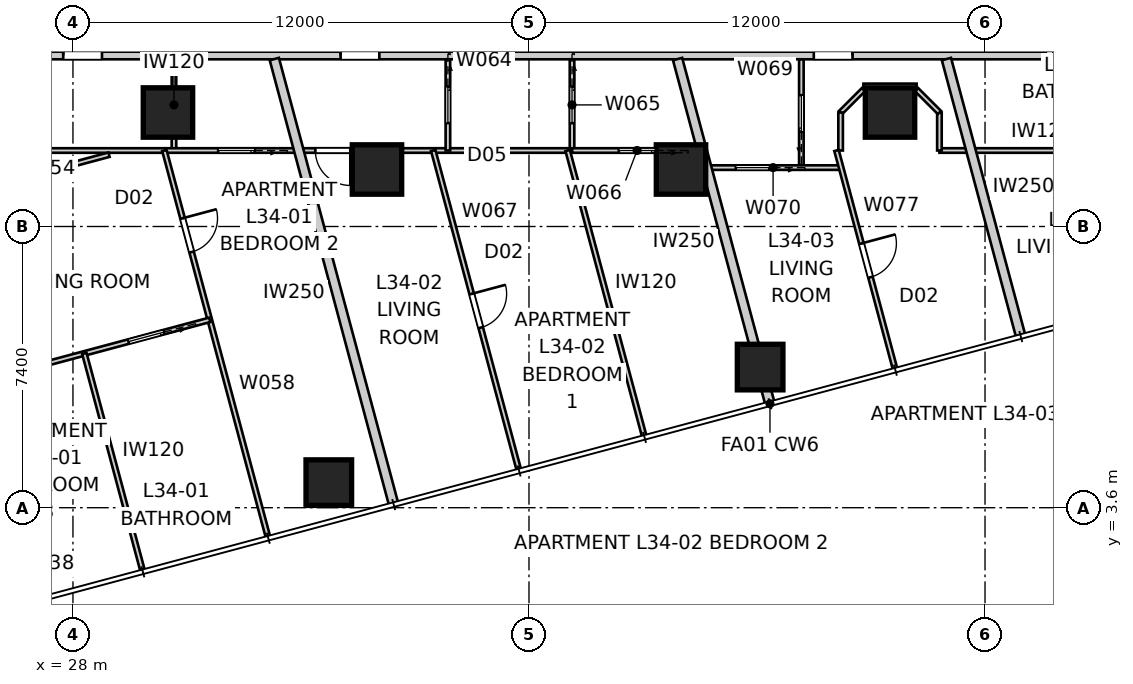
"""IFC4 building model, lengths in metres.
Left out: names, types, materials, properties, quantities, classifications, styles, units other than length and angle.
Written with IfcOpenShell. Run it as: python <this file> out.ifc"""

import sys

from ifc_helpers import new_model, si_unit, direction, frame, frame_2d, origin, origin_2d, place, context, subcontext, project, spatial, rectangle, extrude, element, fill, save


model = new_model("IFC4")
c1 = context("Model", 3, precision=1e-05, world=origin(), true_north=direction((0.0, 1.0)))
c2 = subcontext(c1, "Body", "Model", "MODEL_VIEW")
j1 = project(units=[si_unit("LENGTHUNIT", "METRE"), si_unit("PLANEANGLEUNIT", "RADIAN")], contexts=[c1])
p1 = place(None, origin())
s1 = spatial("IfcSite", under=j1, at=p1, CompositionType="ELEMENT")
p2 = place(p1, origin())
s2 = spatial("IfcBuilding", under=s1, at=p2, CompositionType="ELEMENT")
p3 = place(p2, frame((0.0, 0.0, 125.2)))
s3 = spatial("IfcBuildingStorey", under=s2, at=p3, CompositionType="ELEMENT", Elevation=125.2)
for number, where, z_axis, x_axis in (
    (1, (34.733, 4.26, 0.0), (0.0, 0.0, 1.0), (1.0, 0.0, 0.0)),
    (2, (46.082, 7.301, 0.0), (0.0, 0.0, 1.0), (1.0, 0.0, 0.0)),
):
    element("IfcColumn", number, at=place(p3, frame(where, z_axis=z_axis, x_axis=x_axis)), inside=s3, PredefinedType="COLUMN", context=c2, shape_type="SweptSolid", body=[
        extrude(rectangle(XDim=1.2, YDim=1.2, at=origin_2d()), origin(), (0.0, 0.0, 1.0), 3.4),
    ])
for number, where, z_axis, x_axis in (
    (3, (30.5, 14.0, 0.0), (0.0, 0.0, 1.0), (1.0, 0.0, 0.0)),
    (4, (36.0, 12.5, 0.0), (0.0, 0.0, 1.0), (1.0, 0.0, 0.0)),
    (5, (44.0, 12.5, 0.0), (0.0, 0.0, 1.0), (1.0, 0.0, 0.0)),
    (6, (49.5, 14.0, 0.0), (0.0, 0.0, 1.0), (1.0, 0.0, 0.0)),
):
    element("IfcColumn", number, at=place(p3, frame(where, z_axis=z_axis, x_axis=x_axis)), inside=s3, PredefinedType="COLUMN", context=c2, shape_type="SweptSolid", body=[
        extrude(rectangle(XDim=1.3, YDim=1.3, at=origin_2d()), origin(), (0.0, 0.0, 1.0), 3.4),
    ])
p4 = place(p3, frame((25.5, 15.5, 0.0), z_axis=(0.0, 0.0, 1.0), x_axis=(1.0, 0.0, 0.0)))
e7 = element("IfcWall", 7, at=p4, inside=s3, PredefinedType="PARTITIONING", context=c2, shape_type="SweptSolid", body=[
    extrude(rectangle(XDim=28.2, YDim=0.2, at=frame_2d((14.1, 0.0))), origin(), (0.0, 0.0, 1.0), 3.25),
])
p5 = place(p4, frame((2.244, 0.0, 0.0)))
e8 = element("IfcOpeningElement", 8, at=p5, cuts=e7, PredefinedType="OPENING", context=c2, shape_type="SweptSolid", body=[
    extrude(rectangle(XDim=1.02, YDim=2.1, at=frame_2d((0.51, 1.05))), frame((0.0, 0.11, 0.0), z_axis=(0.0, -1.0, 0.0), x_axis=(1.0, 0.0, 0.0)), (0.0, 0.0, 1.0), 0.22),
])
p6 = place(p4, frame((9.542, 0.0, 0.0)))
e9 = element("IfcOpeningElement", 9, at=p6, cuts=e7, PredefinedType="OPENING", context=c2, shape_type="SweptSolid", body=[
    extrude(rectangle(XDim=1.02, YDim=2.34, at=frame_2d((0.51, 1.17))), frame((0.0, 0.11, 0.0), z_axis=(0.0, -1.0, 0.0), x_axis=(1.0, 0.0, 0.0)), (0.0, 0.0, 1.0), 0.22),
])
p7 = place(p4, frame((21.994, 0.0, 0.0)))
e10 = element("IfcOpeningElement", 10, at=p7, cuts=e7, PredefinedType="OPENING", context=c2, shape_type="SweptSolid", body=[
    extrude(rectangle(XDim=1.02, YDim=2.34, at=frame_2d((0.51, 1.17))), frame((0.0, 0.11, 0.0), z_axis=(0.0, -1.0, 0.0), x_axis=(1.0, 0.0, 0.0)), (0.0, 0.0, 1.0), 0.22),
])
p8 = place(p3, frame((53.7, 15.5, 0.0), z_axis=(0.0, 0.0, 1.0), x_axis=(0.0, 1.0, 0.0)))
e11 = element("IfcWall", 11, at=p8, inside=s3, PredefinedType="PARTITIONING", context=c2, shape_type="SweptSolid", body=[
    extrude(rectangle(XDim=0.426, YDim=0.2, at=frame_2d((0.213, 0.0))), origin(), (0.0, 0.0, 1.0), 3.25),
])
p9 = place(p3, frame((36.44, 3.682, 0.0), z_axis=(0.0, 0.0, 1.0), x_axis=(-0.258824223352, 0.965924438766, 0.0)))
e12 = element("IfcWall", 12, at=p9, inside=s3, PredefinedType="PARTITIONING", context=c2, shape_type="SweptSolid", body=[
    extrude(rectangle(XDim=12.138, YDim=0.25, at=frame_2d((6.069, 0.0))), origin(), (0.0, 0.0, 1.0), 3.25),
])
p10 = place(p3, frame((46.341, 6.335, 0.0), z_axis=(0.0, 0.0, 1.0), x_axis=(-0.258814481793, 0.965927049013, 0.0)))
e13 = element("IfcWall", 13, at=p10, inside=s3, PredefinedType="PARTITIONING", context=c2, shape_type="SweptSolid", body=[
    extrude(rectangle(XDim=9.392, YDim=0.25, at=frame_2d((4.696, 0.0))), origin(), (0.0, 0.0, 1.0), 3.25),
])
p11 = place(p3, frame((52.942, 8.104, 0.0), z_axis=(0.0, 0.0, 1.0), x_axis=(-0.258822171171, 0.965924988656, 0.0)))
e14 = element("IfcWall", 14, at=p11, inside=s3, PredefinedType="PARTITIONING", context=c2, shape_type="SweptSolid", body=[
    extrude(rectangle(XDim=7.56, YDim=0.25, at=frame_2d((3.78, 0.0))), origin(), (0.0, 0.0, 1.0), 3.25),
])
p12 = place(p3, frame((30.658, 15.4, 0.0), z_axis=(0.0, 0.0, 1.0), x_axis=(0.0, -1.0, 0.0)))
e15 = element("IfcWall", 15, at=p12, inside=s3, PredefinedType="PARTITIONING", context=c2, shape_type="SweptSolid", body=[
    extrude(rectangle(XDim=2.4, YDim=0.12, at=frame_2d((1.2, 0.0))), origin(), (0.0, 0.0, 1.0), 3.25),
])
p13 = place(p3, frame((41.07, 13.0, 0.0), z_axis=(0.0, 0.0, 1.0), x_axis=(-1.0, 0.0, 0.0)))
e16 = element("IfcWall", 16, at=p13, inside=s3, PredefinedType="PARTITIONING", context=c2, shape_type="SweptSolid", body=[
    extrude(rectangle(XDim=15.67, YDim=0.12, at=frame_2d((7.835, 0.0))), origin(), (0.0, 0.0, 1.0), 2.55),
])
p14 = place(p13, frame((5.772, 0.0, 0.0)))
e17 = element("IfcOpeningElement", 17, at=p14, cuts=e16, PredefinedType="OPENING", context=c2, shape_type="SweptSolid", body=[
    extrude(rectangle(XDim=0.92, YDim=2.34, at=frame_2d((0.46, 1.17))), frame((0.0, 0.07, 0.0), z_axis=(0.0, -1.0, 0.0), x_axis=(1.0, 0.0, 0.0)), (0.0, 0.0, 1.0), 0.14),
])
p15 = place(p13, frame((8.289, 0.0, 0.0)))
e18 = element("IfcOpeningElement", 18, at=p15, cuts=e16, PredefinedType="OPENING", context=c2, shape_type="SweptSolid", body=[
    extrude(rectangle(XDim=0.96, YDim=2.1, at=frame_2d((0.48, 1.05))), frame((0.0, 0.07, 0.0), z_axis=(0.0, -1.0, 0.0), x_axis=(1.0, 0.0, 0.0)), (0.0, 0.0, 1.0), 0.14),
])
p16 = place(p3, frame((30.406, 13.0, 0.0), z_axis=(0.0, 0.0, 1.0), x_axis=(0.258819200315, -0.9659257847, 0.0)))
e19 = element("IfcWall", 19, at=p16, inside=s3, PredefinedType="PARTITIONING", context=c2, shape_type="SweptSolid", body=[
    extrude(rectangle(XDim=10.522, YDim=0.12, at=frame_2d((5.261, 0.0))), origin(), (0.0, 0.0, 1.0), 2.722),
])
p17 = place(p16, frame((1.846, 0.0, 0.0)))
e20 = element("IfcOpeningElement", 20, at=p17, cuts=e19, PredefinedType="OPENING", context=c2, shape_type="SweptSolid", body=[
    extrude(rectangle(XDim=0.92, YDim=2.34, at=frame_2d((0.46, 1.17))), frame((0.0, 0.07, 0.0), z_axis=(0.0, -1.0, 0.0), x_axis=(1.0, 0.0, 0.0)), (0.0, 0.0, 1.0), 0.14),
])
p18 = place(p3, frame((31.6, 8.544, 0.0), z_axis=(0.0, 0.0, 1.0), x_axis=(-0.965927151587, -0.258814098973, 0.0)))
e21 = element("IfcWall", 21, at=p18, inside=s3, PredefinedType="PARTITIONING", context=c2, shape_type="SweptSolid", body=[
    extrude(rectangle(XDim=10.793, YDim=0.12, at=frame_2d((5.396, 0.0))), origin(), (0.0, 0.0, 1.0), 3.25),
])
p19 = place(p18, frame((6.64, 0.0, 0.0)))
e22 = element("IfcOpeningElement", 22, at=p19, cuts=e21, PredefinedType="OPENING", context=c2, shape_type="SweptSolid", body=[
    extrude(rectangle(XDim=0.92, YDim=2.34, at=frame_2d((0.46, 1.17))), frame((0.0, 0.07, 0.0), z_axis=(0.0, -1.0, 0.0), x_axis=(1.0, 0.0, 0.0)), (0.0, 0.0, 1.0), 0.14),
])
p20 = place(p18, frame((1.253, 0.0, 0.0)))
e23 = element("IfcOpeningElement", 23, at=p20, cuts=e21, PredefinedType="OPENING", context=c2, shape_type="SweptSolid", body=[
    extrude(rectangle(XDim=0.96, YDim=2.1, at=frame_2d((0.48, 1.05))), frame((0.0, 0.07, 0.0), z_axis=(0.0, -1.0, 0.0), x_axis=(1.0, 0.0, 0.0)), (0.0, 0.0, 1.0), 0.14),
])
p21 = place(p3, frame((19.911, 10.468, 0.0), z_axis=(0.0, 0.0, 1.0), x_axis=(0.965927203676, 0.25881390457, 0.0)))
e24 = element("IfcWall", 24, at=p21, inside=s3, PredefinedType="PARTITIONING", context=c2, shape_type="SweptSolid", body=[
    extrude(rectangle(XDim=9.357, YDim=0.12, at=frame_2d((4.678, 0.0))), origin(), (0.0, 0.0, 1.0), 2.638),
])
p22 = place(p21, frame((4.411, 0.0, 0.0)))
e25 = element("IfcOpeningElement", 25, at=p22, cuts=e24, PredefinedType="OPENING", context=c2, shape_type="SweptSolid", body=[
    extrude(rectangle(XDim=0.92, YDim=2.34, at=frame_2d((0.46, 1.17))), frame((0.0, 0.07, 0.0), z_axis=(0.0, -1.0, 0.0), x_axis=(1.0, 0.0, 0.0)), (0.0, 0.0, 1.0), 0.14),
])
p23 = place(p3, frame((28.3, 7.66, 0.0), z_axis=(0.0, 0.0, 1.0), x_axis=(0.25882212607, -0.965925000741, 0.0)))
e26 = element("IfcWall", 26, at=p23, inside=s3, PredefinedType="PARTITIONING", context=c2, shape_type="SweptSolid", body=[
    extrude(rectangle(XDim=5.91, YDim=0.12, at=frame_2d((2.955, 0.0))), origin(), (0.0, 0.0, 1.0), 3.25),
])
p24 = place(p3, frame((37.866, 15.4, 0.0), z_axis=(0.0, 0.0, 1.0), x_axis=(0.0, -1.0, 0.0)))
e27 = element("IfcWall", 27, at=p24, inside=s3, PredefinedType="PARTITIONING", context=c2, shape_type="SweptSolid", body=[
    extrude(rectangle(XDim=2.4, YDim=0.12, at=frame_2d((1.2, 0.0))), origin(), (0.0, 0.0, 1.0), 3.25),
])
p25 = place(p24, frame((0.72, 0.0, 0.0)))
e28 = element("IfcOpeningElement", 28, at=p25, cuts=e27, PredefinedType="OPENING", context=c2, shape_type="SweptSolid", body=[
    extrude(rectangle(XDim=0.96, YDim=2.1, at=frame_2d((0.48, 1.05))), frame((0.0, 0.07, 0.0), z_axis=(0.0, -1.0, 0.0), x_axis=(1.0, 0.0, 0.0)), (0.0, 0.0, 1.0), 0.14),
])
p26 = place(p3, frame((41.132, 15.4, 0.0), z_axis=(0.0, 0.0, 1.0), x_axis=(0.0, -1.0, 0.0)))
e29 = element("IfcWall", 29, at=p26, inside=s3, PredefinedType="PARTITIONING", context=c2, shape_type="SweptSolid", body=[
    extrude(rectangle(XDim=2.4, YDim=0.12, at=frame_2d((1.2, 0.0))), origin(), (0.0, 0.0, 1.0), 3.25),
])
p27 = place(p26, frame((0.72, 0.0, 0.0)))
e30 = element("IfcOpeningElement", 30, at=p27, cuts=e29, PredefinedType="OPENING", context=c2, shape_type="SweptSolid", body=[
    extrude(rectangle(XDim=0.96, YDim=2.1, at=frame_2d((0.48, 1.05))), frame((0.0, 0.07, 0.0), z_axis=(0.0, -1.0, 0.0), x_axis=(1.0, 0.0, 0.0)), (0.0, 0.0, 1.0), 0.14),
])
p28 = place(p3, frame((44.555, 13.0, 0.0), z_axis=(0.0, 0.0, 1.0), x_axis=(-1.0, 0.0, 0.0)))
e31 = element("IfcWall", 31, at=p28, inside=s3, PredefinedType="PARTITIONING", context=c2, shape_type="SweptSolid", body=[
    extrude(rectangle(XDim=3.423, YDim=0.12, at=frame_2d((1.711, 0.0))), origin(), (0.0, 0.0, 1.0), 3.25),
])
p29 = place(p28, frame((1.231, 0.0, 0.0)))
e32 = element("IfcOpeningElement", 32, at=p29, cuts=e31, PredefinedType="OPENING", context=c2, shape_type="SweptSolid", body=[
    extrude(rectangle(XDim=0.96, YDim=2.1, at=frame_2d((0.48, 1.05))), frame((0.0, 0.07, 0.0), z_axis=(0.0, -1.0, 0.0), x_axis=(1.0, 0.0, 0.0)), (0.0, 0.0, 1.0), 0.14),
])
p30 = place(p3, frame((37.481, 13.0, 0.0), z_axis=(0.0, 0.0, 1.0), x_axis=(0.258819860698, -0.965925607751, 0.0)))
e33 = element("IfcWall", 33, at=p30, inside=s3, PredefinedType="PARTITIONING", context=c2, shape_type="SweptSolid", body=[
    extrude(rectangle(XDim=8.691, YDim=0.12, at=frame_2d((4.346, 0.0))), origin(), (0.0, 0.0, 1.0), 3.25),
])
p31 = place(p30, frame((3.906, 0.0, 0.0)))
e34 = element("IfcOpeningElement", 34, at=p31, cuts=e33, PredefinedType="OPENING", context=c2, shape_type="SweptSolid", body=[
    extrude(rectangle(XDim=0.92, YDim=2.34, at=frame_2d((0.46, 1.17))), frame((0.0, 0.07, 0.0), z_axis=(0.0, -1.0, 0.0), x_axis=(1.0, 0.0, 0.0)), (0.0, 0.0, 1.0), 0.14),
])
p32 = place(p3, frame((41.018, 13.0, 0.0), z_axis=(0.0, 0.0, 1.0), x_axis=(0.258813509689, -0.965927309482, 0.0)))
e35 = element("IfcWall", 35, at=p32, inside=s3, PredefinedType="PARTITIONING", context=c2, shape_type="SweptSolid", body=[
    extrude(rectangle(XDim=7.776, YDim=0.12, at=frame_2d((3.888, 0.0))), origin(), (0.0, 0.0, 1.0), 3.25),
])
p33 = place(p3, frame((47.167, 12.55, 0.0), z_axis=(0.0, 0.0, 1.0), x_axis=(0.0, 1.0, 0.0)))
e36 = element("IfcWall", 36, at=p33, inside=s3, PredefinedType="PARTITIONING", context=c2, shape_type="SweptSolid", body=[
    extrude(rectangle(XDim=2.85, YDim=0.12, at=frame_2d((1.425, 0.0))), origin(), (0.0, 0.0, 1.0), 3.25),
])
p34 = place(p33, frame((0.945, 0.0, 0.0)))
e37 = element("IfcOpeningElement", 37, at=p34, cuts=e36, PredefinedType="OPENING", context=c2, shape_type="SweptSolid", body=[
    extrude(rectangle(XDim=0.96, YDim=2.1, at=frame_2d((0.48, 1.05))), frame((0.0, 0.07, 0.0), z_axis=(0.0, -1.0, 0.0), x_axis=(1.0, 0.0, 0.0)), (0.0, 0.0, 1.0), 0.14),
])
p35 = place(p3, frame((48.171, 12.55, 0.0), z_axis=(0.0, 0.0, 1.0), x_axis=(-1.0, 0.0, 0.0)))
e38 = element("IfcWall", 38, at=p35, inside=s3, PredefinedType="PARTITIONING", context=c2, shape_type="SweptSolid", body=[
    extrude(rectangle(XDim=3.495, YDim=0.12, at=frame_2d((1.748, 0.0))), origin(), (0.0, 0.0, 1.0), 3.25),
])
p36 = place(p35, frame((1.77, 0.0, 0.0)))
e39 = element("IfcOpeningElement", 39, at=p36, cuts=e38, PredefinedType="OPENING", context=c2, shape_type="SweptSolid", body=[
    extrude(rectangle(XDim=0.96, YDim=2.1, at=frame_2d((0.48, 1.05))), frame((0.0, 0.07, 0.0), z_axis=(0.0, -1.0, 0.0), x_axis=(1.0, 0.0, 0.0)), (0.0, 0.0, 1.0), 0.14),
])
p37 = place(p3, frame((56.2, 13.0, 0.0), z_axis=(0.0, 0.0, 1.0), x_axis=(-1.0, 0.0, 0.0)))
e40 = element("IfcWall", 40, at=p37, inside=s3, PredefinedType="PARTITIONING", context=c2, shape_type="SweptSolid", body=[
    extrude(rectangle(XDim=5.4, YDim=0.12, at=frame_2d((2.7, 0.0))), origin(), (0.0, 0.0, 1.0), 3.25),
])
p38 = place(p3, frame((50.8, 13.0, 0.0), z_axis=(0.0, 0.0, 1.0), x_axis=(0.0, 1.0, 0.0)))
e41 = element("IfcWall", 41, at=p38, inside=s3, PredefinedType="PARTITIONING", context=c2, shape_type="SweptSolid", body=[
    extrude(rectangle(XDim=1.0, YDim=0.12, at=frame_2d((0.5, 0.0))), origin(), (0.0, 0.0, 1.0), 3.25),
])
p39 = place(p3, frame((50.8, 14.0, 0.0), z_axis=(0.0, 0.0, 1.0), x_axis=(-0.707106781187, 0.707106781187, 0.0)))
e42 = element("IfcWall", 42, at=p39, inside=s3, PredefinedType="PARTITIONING", context=c2, shape_type="SweptSolid", body=[
    extrude(rectangle(XDim=0.849, YDim=0.12, at=frame_2d((0.424, 0.0))), origin(), (0.0, 0.0, 1.0), 3.25),
])
p40 = place(p3, frame((50.2, 14.7, 0.0), z_axis=(0.0, 0.0, 1.0), x_axis=(-1.0, 0.0, 0.0)))
e43 = element("IfcWall", 43, at=p40, inside=s3, PredefinedType="PARTITIONING", context=c2, shape_type="SweptSolid", body=[
    extrude(rectangle(XDim=1.4, YDim=0.12, at=frame_2d((0.7, 0.0))), origin(), (0.0, 0.0, 1.0), 3.25),
])
p41 = place(p3, frame((48.8, 14.6, 0.0), z_axis=(0.0, 0.0, 1.0), x_axis=(-0.707106781187, -0.707106781187, 0.0)))
e44 = element("IfcWall", 44, at=p41, inside=s3, PredefinedType="PARTITIONING", context=c2, shape_type="SweptSolid", body=[
    extrude(rectangle(XDim=0.849, YDim=0.12, at=frame_2d((0.424, 0.0))), origin(), (0.0, 0.0, 1.0), 3.25),
])
p42 = place(p3, frame((48.2, 14.0, 0.0), z_axis=(0.0, 0.0, 1.0), x_axis=(0.0, -1.0, 0.0)))
e45 = element("IfcWall", 45, at=p42, inside=s3, PredefinedType="PARTITIONING", context=c2, shape_type="SweptSolid", body=[
    extrude(rectangle(XDim=1.0, YDim=0.12, at=frame_2d((0.5, 0.0))), origin(), (0.0, 0.0, 1.0), 3.25),
])
p43 = place(p3, frame((48.092, 13.0, 0.0), z_axis=(0.0, 0.0, 1.0), x_axis=(0.258812722515, -0.965927520399, 0.0)))
e46 = element("IfcWall", 46, at=p43, inside=s3, PredefinedType="PARTITIONING", context=c2, shape_type="SweptSolid", body=[
    extrude(rectangle(XDim=5.945, YDim=0.12, at=frame_2d((2.972, 0.0))), origin(), (0.0, 0.0, 1.0), 3.25),
])
p44 = place(p43, frame((2.532, 0.0, 0.0)))
e47 = element("IfcOpeningElement", 47, at=p44, cuts=e46, PredefinedType="OPENING", context=c2, shape_type="SweptSolid", body=[
    extrude(rectangle(XDim=0.92, YDim=2.34, at=frame_2d((0.46, 1.17))), frame((0.0, 0.07, 0.0), z_axis=(0.0, -1.0, 0.0), x_axis=(1.0, 0.0, 0.0)), (0.0, 0.0, 1.0), 0.14),
])
p45 = place(p5, origin())
e48 = element("IfcDoor", 48, at=p45, inside=s3, OperationType="SINGLE_SWING_LEFT", PredefinedType="DOOR", context=c2, shape_type="SweptSolid", body=[
    extrude(rectangle(XDim=1.02, YDim=2.1, at=frame_2d((0.51, 1.05))), frame((0.0, 0.025, 0.0), z_axis=(0.0, -1.0, 0.0), x_axis=(1.0, 0.0, 0.0)), (0.0, 0.0, 1.0), 0.05),
])
fill(e8, e48)
p46 = place(p6, origin())
e49 = element("IfcDoor", 49, at=p46, inside=s3, OperationType="SINGLE_SWING_LEFT", PredefinedType="DOOR", context=c2, shape_type="SweptSolid", body=[
    extrude(rectangle(XDim=1.02, YDim=2.34, at=frame_2d((0.51, 1.17))), frame((0.0, 0.025, 0.0), z_axis=(0.0, -1.0, 0.0), x_axis=(1.0, 0.0, 0.0)), (0.0, 0.0, 1.0), 0.05),
])
fill(e9, e49)
p47 = place(p7, origin())
e50 = element("IfcDoor", 50, at=p47, inside=s3, OperationType="SINGLE_SWING_RIGHT", PredefinedType="DOOR", context=c2, shape_type="SweptSolid", body=[
    extrude(rectangle(XDim=1.02, YDim=2.34, at=frame_2d((0.51, 1.17))), frame((0.0, 0.025, 0.0), z_axis=(0.0, -1.0, 0.0), x_axis=(1.0, 0.0, 0.0)), (0.0, 0.0, 1.0), 0.05),
])
fill(e10, e50)
p48 = place(p14, origin())
e51 = element("IfcDoor", 51, at=p48, inside=s3, OperationType="SINGLE_SWING_LEFT", PredefinedType="DOOR", context=c2, shape_type="SweptSolid", body=[
    extrude(rectangle(XDim=0.92, YDim=2.34, at=frame_2d((0.46, 1.17))), frame((0.0, 0.025, 0.0), z_axis=(0.0, -1.0, 0.0), x_axis=(1.0, 0.0, 0.0)), (0.0, 0.0, 1.0), 0.05),
])
fill(e17, e51)
p49 = place(p25, origin())
e52 = element("IfcDoor", 52, at=p49, inside=s3, OperationType="SLIDING_TO_LEFT", PredefinedType="DOOR", context=c2, shape_type="SweptSolid", body=[
    extrude(rectangle(XDim=0.96, YDim=2.1, at=frame_2d((0.48, 1.05))), frame((0.0, 0.025, 0.0), z_axis=(0.0, -1.0, 0.0), x_axis=(1.0, 0.0, 0.0)), (0.0, 0.0, 1.0), 0.05),
])
fill(e28, e52)
p50 = place(p34, origin())
e53 = element("IfcDoor", 53, at=p50, inside=s3, OperationType="SLIDING_TO_LEFT", PredefinedType="DOOR", context=c2, shape_type="SweptSolid", body=[
    extrude(rectangle(XDim=0.96, YDim=2.1, at=frame_2d((0.48, 1.05))), frame((0.0, 0.025, 0.0), z_axis=(0.0, -1.0, 0.0), x_axis=(1.0, 0.0, 0.0)), (0.0, 0.0, 1.0), 0.05),
])
fill(e37, e53)
p51 = place(p31, origin())
e54 = element("IfcDoor", 54, at=p51, inside=s3, OperationType="SINGLE_SWING_LEFT", PredefinedType="DOOR", context=c2, shape_type="SweptSolid", body=[
    extrude(rectangle(XDim=0.92, YDim=2.34, at=frame_2d((0.46, 1.17))), frame((0.0, 0.025, 0.0), z_axis=(0.0, -1.0, 0.0), x_axis=(1.0, 0.0, 0.0)), (0.0, 0.0, 1.0), 0.05),
])
fill(e34, e54)
p52 = place(p27, origin())
e55 = element("IfcDoor", 55, at=p52, inside=s3, OperationType="SLIDING_TO_LEFT", PredefinedType="DOOR", context=c2, shape_type="SweptSolid", body=[
    extrude(rectangle(XDim=0.96, YDim=2.1, at=frame_2d((0.48, 1.05))), frame((0.0, 0.025, 0.0), z_axis=(0.0, -1.0, 0.0), x_axis=(1.0, 0.0, 0.0)), (0.0, 0.0, 1.0), 0.05),
])
fill(e30, e55)
p53 = place(p36, origin())
e56 = element("IfcDoor", 56, at=p53, inside=s3, OperationType="SLIDING_TO_LEFT", PredefinedType="DOOR", context=c2, shape_type="SweptSolid", body=[
    extrude(rectangle(XDim=0.96, YDim=2.1, at=frame_2d((0.48, 1.05))), frame((0.0, 0.025, 0.0), z_axis=(0.0, -1.0, 0.0), x_axis=(1.0, 0.0, 0.0)), (0.0, 0.0, 1.0), 0.05),
])
fill(e39, e56)
p54 = place(p17, origin())
e57 = element("IfcDoor", 57, at=p54, inside=s3, OperationType="SINGLE_SWING_LEFT", PredefinedType="DOOR", context=c2, shape_type="SweptSolid", body=[
    extrude(rectangle(XDim=0.92, YDim=2.34, at=frame_2d((0.46, 1.17))), frame((0.0, 0.025, 0.0), z_axis=(0.0, -1.0, 0.0), x_axis=(1.0, 0.0, 0.0)), (0.0, 0.0, 1.0), 0.05),
])
fill(e20, e57)
p55 = place(p20, origin())
e58 = element("IfcDoor", 58, at=p55, inside=s3, OperationType="SLIDING_TO_LEFT", PredefinedType="DOOR", context=c2, shape_type="SweptSolid", body=[
    extrude(rectangle(XDim=0.96, YDim=2.1, at=frame_2d((0.48, 1.05))), frame((0.0, 0.025, 0.0), z_axis=(0.0, -1.0, 0.0), x_axis=(1.0, 0.0, 0.0)), (0.0, 0.0, 1.0), 0.05),
])
fill(e23, e58)
p56 = place(p29, origin())
e59 = element("IfcDoor", 59, at=p56, inside=s3, OperationType="SLIDING_TO_LEFT", PredefinedType="DOOR", context=c2, shape_type="SweptSolid", body=[
    extrude(rectangle(XDim=0.96, YDim=2.1, at=frame_2d((0.48, 1.05))), frame((0.0, 0.025, 0.0), z_axis=(0.0, -1.0, 0.0), x_axis=(1.0, 0.0, 0.0)), (0.0, 0.0, 1.0), 0.05),
])
fill(e32, e59)
p57 = place(p44, origin())
e60 = element("IfcDoor", 60, at=p57, inside=s3, OperationType="SINGLE_SWING_LEFT", PredefinedType="DOOR", context=c2, shape_type="SweptSolid", body=[
    extrude(rectangle(XDim=0.92, YDim=2.34, at=frame_2d((0.46, 1.17))), frame((0.0, 0.025, 0.0), z_axis=(0.0, -1.0, 0.0), x_axis=(1.0, 0.0, 0.0)), (0.0, 0.0, 1.0), 0.05),
])
fill(e47, e60)
p58 = place(p15, origin())
e61 = element("IfcDoor", 61, at=p58, inside=s3, OperationType="SLIDING_TO_LEFT", PredefinedType="DOOR", context=c2, shape_type="SweptSolid", body=[
    extrude(rectangle(XDim=0.96, YDim=2.1, at=frame_2d((0.48, 1.05))), frame((0.0, 0.025, 0.0), z_axis=(0.0, -1.0, 0.0), x_axis=(1.0, 0.0, 0.0)), (0.0, 0.0, 1.0), 0.05),
])
fill(e18, e61)
save(model, sys.argv[1])
